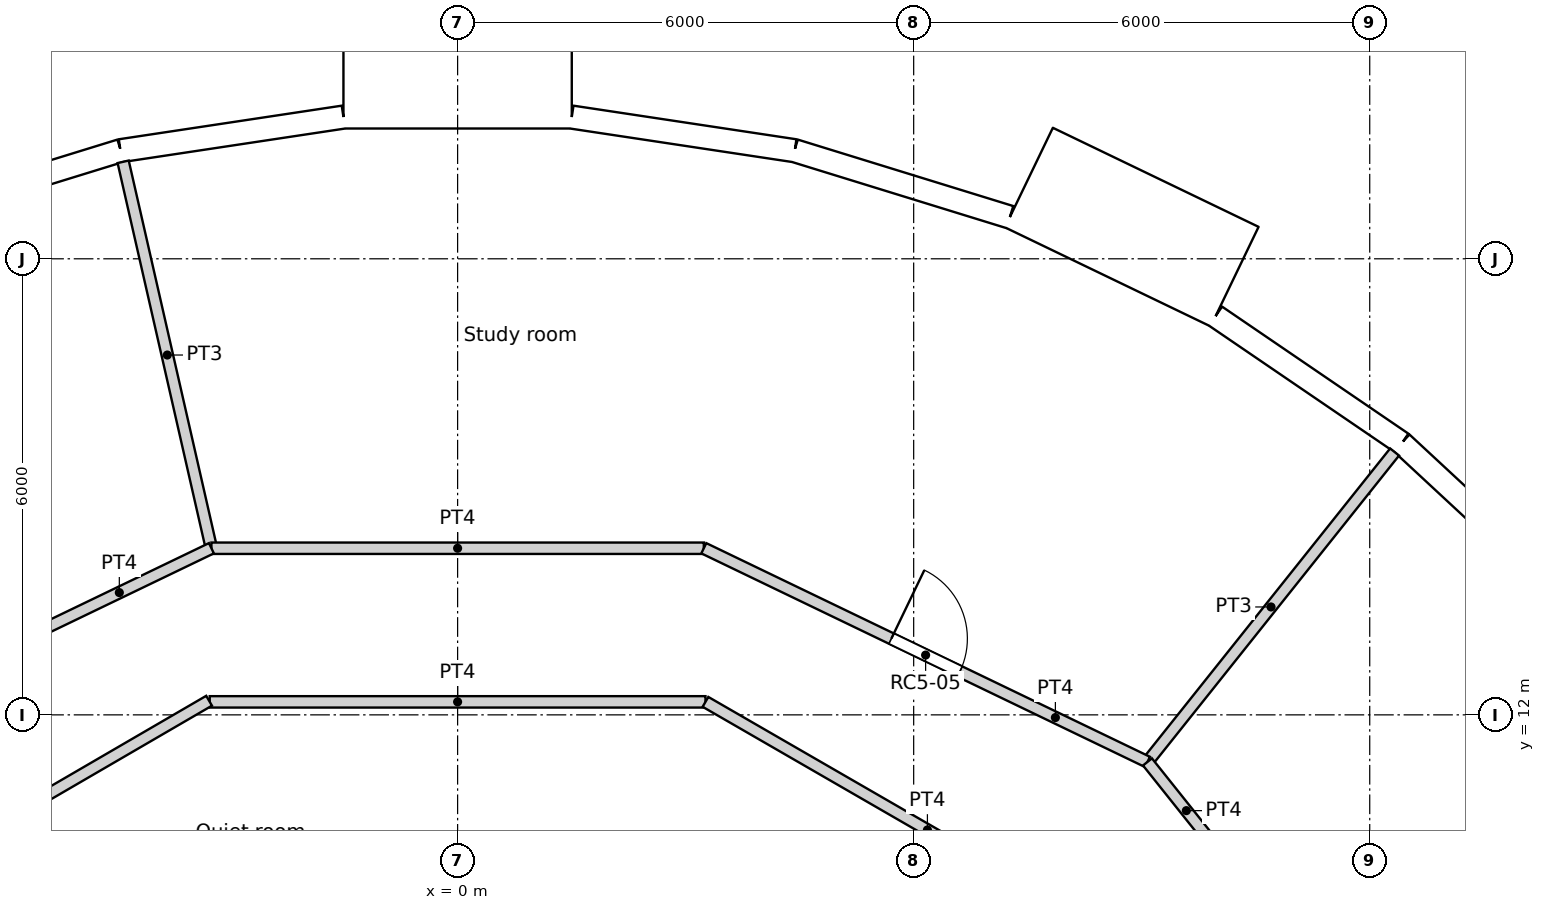
"""IFC4 building model, lengths in metres.
Left out: names, types, materials, properties, quantities, classifications, styles, units other than length and angle.
Written with IfcOpenShell. Run it as: python <this file> out.ifc"""

import sys

from ifc_helpers import new_model, si_unit, direction, frame, frame_2d, origin, origin_2d, place, context, subcontext, project, spatial, rectangle, circle, extrude, element, fill, save


model = new_model("IFC4")
c1 = context("Model", 3, precision=1e-05, world=origin(), true_north=direction((0.0, 1.0)))
c2 = subcontext(c1, "Body", "Model", "MODEL_VIEW")
j1 = project(units=[si_unit("LENGTHUNIT", "METRE"), si_unit("PLANEANGLEUNIT", "RADIAN")], contexts=[c1])
p1 = place(None, origin())
s1 = spatial("IfcSite", under=j1, at=p1, CompositionType="ELEMENT")
p2 = place(p1, origin())
s2 = spatial("IfcBuilding", under=s1, at=p2, CompositionType="ELEMENT")
p3 = place(p2, frame((0.0, 0.0, 270.6)))
s3 = spatial("IfcBuildingStorey", under=s2, at=p3, CompositionType="ELEMENT", Elevation=270.6)
for number, where, z_axis, x_axis in (
    (1, (11.735, 14.716, 0.0), (0.0, 0.0, 1.0), (1.0, 0.0, 0.0)),
    (2, (6.876, 17.521, 0.0), (0.0, 0.0, 1.0), (1.0, 0.0, 0.0)),
    (3, (1.406, 18.77, 0.0), (0.0, 0.0, 1.0), (1.0, 0.0, 0.0)),
    (4, (-4.188, 18.35, 0.0), (0.0, 0.0, 1.0), (1.0, 0.0, 0.0)),
):
    element("IfcColumn", number, at=place(p3, frame(where, z_axis=z_axis, x_axis=x_axis)), inside=s3, PredefinedType="COLUMN", context=c2, shape_type="SweptSolid", body=[
        extrude(circle(Radius=0.55, at=origin_2d()), origin(), (0.0, 0.0, 1.0), 3.6),
    ])
p4 = place(p3, frame((14.593, 13.561, 0.0), z_axis=(0.0, 0.0, 1.0), x_axis=(-0.733028283666, 0.680198158882, 0.0)))
e5 = element("IfcWall", 5, at=p4, inside=s3, PredefinedType="SOLIDWALL", context=c2, shape_type="SweptSolid", body=[
    extrude(rectangle(XDim=2.962, YDim=0.3, at=frame_2d((1.481, 0.0))), origin(), (0.0, 0.0, 1.0), 3.25),
])
p5 = place(p4, frame((1.481, 0.0, 1.55)))
e6 = element("IfcOpeningElement", 6, at=p5, cuts=e5, PredefinedType="OPENING", context=c2, shape_type="SweptSolid", body=[
    extrude(circle(Radius=0.9, at=origin_2d()), frame((0.0, 0.16, 0.0), z_axis=(0.0, -1.0, 0.0), x_axis=(1.0, 0.0, 0.0)), (0.0, 0.0, 1.0), 0.32),
])
p6 = place(p3, frame((12.421, 15.575, 0.0), z_axis=(0.0, 0.0, 1.0), x_axis=(-0.826236061068, 0.563324037646, 0.0)))
e7 = element("IfcWall", 7, at=p6, inside=s3, PredefinedType="SOLIDWALL", context=c2, shape_type="SweptSolid", body=[
    extrude(rectangle(XDim=2.962, YDim=0.3, at=frame_2d((1.481, 0.0))), origin(), (0.0, 0.0, 1.0), 3.25),
])
p7 = place(p6, frame((1.481, 0.0, 1.55)))
e8 = element("IfcOpeningElement", 8, at=p7, cuts=e7, PredefinedType="OPENING", context=c2, shape_type="SweptSolid", body=[
    extrude(circle(Radius=0.9, at=origin_2d()), frame((0.0, 0.16, 0.0), z_axis=(0.0, -1.0, 0.0), x_axis=(1.0, 0.0, 0.0)), (0.0, 0.0, 1.0), 0.32),
])
p8 = place(p3, frame((10.22, 17.766, -0.35), z_axis=(0.0, 0.0, 1.0), x_axis=(-0.900953362039, 0.433915935904, 0.0)))
e9 = element("IfcWall", 9, at=p8, inside=s3, PredefinedType="ELEMENTEDWALL", context=c2, shape_type="SweptSolid", body=[
    extrude(rectangle(XDim=3.0, YDim=1.45, at=frame_2d((1.5, 0.0))), origin(), (0.0, 0.0, 1.0), 3.6),
])
p9 = place(p8, frame((1.5, 0.0, 1.9)))
e10 = element("IfcOpeningElement", 10, at=p9, cuts=e9, PredefinedType="OPENING", context=c2, shape_type="SweptSolid", body=[
    extrude(circle(Radius=0.9, at=origin_2d()), frame((0.0, 0.735, 0.0), z_axis=(0.0, -1.0, 0.0), x_axis=(1.0, 0.0, 0.0)), (0.0, 0.0, 1.0), 1.47),
])
p10 = place(p3, frame((7.264, 18.549, 0.0), z_axis=(0.0, 0.0, 1.0), x_axis=(-0.955555982805, 0.29480970765, 0.0)))
e11 = element("IfcWall", 11, at=p10, inside=s3, PredefinedType="SOLIDWALL", context=c2, shape_type="SweptSolid", body=[
    extrude(rectangle(XDim=2.962, YDim=0.3, at=frame_2d((1.481, 0.0))), origin(), (0.0, 0.0, 1.0), 3.25),
])
p11 = place(p10, frame((1.481, 0.0, 1.55)))
e12 = element("IfcOpeningElement", 12, at=p11, cuts=e11, PredefinedType="OPENING", context=c2, shape_type="SweptSolid", body=[
    extrude(circle(Radius=0.9, at=origin_2d()), frame((0.0, 0.16, 0.0), z_axis=(0.0, -1.0, 0.0), x_axis=(1.0, 0.0, 0.0)), (0.0, 0.0, 1.0), 0.32),
])
p12 = place(p3, frame((4.433, 19.422, 0.0), z_axis=(0.0, 0.0, 1.0), x_axis=(-0.988835775663, 0.149009425104, 0.0)))
e13 = element("IfcWall", 13, at=p12, inside=s3, PredefinedType="SOLIDWALL", context=c2, shape_type="SweptSolid", body=[
    extrude(rectangle(XDim=2.962, YDim=0.3, at=frame_2d((1.481, 0.0))), origin(), (0.0, 0.0, 1.0), 3.25),
])
p13 = place(p12, frame((1.481, 0.0, 1.55)))
e14 = element("IfcOpeningElement", 14, at=p13, cuts=e13, PredefinedType="OPENING", context=c2, shape_type="SweptSolid", body=[
    extrude(circle(Radius=0.9, at=origin_2d()), frame((0.0, 0.16, 0.0), z_axis=(0.0, -1.0, 0.0), x_axis=(1.0, 0.0, 0.0)), (0.0, 0.0, 1.0), 0.32),
])
p14 = place(p3, frame((1.5, 20.441, -0.35), z_axis=(0.0, 0.0, 1.0), x_axis=(-1.0, 0.0, 0.0)))
e15 = element("IfcWall", 15, at=p14, inside=s3, PredefinedType="ELEMENTEDWALL", context=c2, shape_type="SweptSolid", body=[
    extrude(rectangle(XDim=3.0, YDim=1.45, at=frame_2d((1.5, 0.0))), origin(), (0.0, 0.0, 1.0), 3.6),
])
p15 = place(p14, frame((1.5, 0.0, 1.9)))
e16 = element("IfcOpeningElement", 16, at=p15, cuts=e15, PredefinedType="OPENING", context=c2, shape_type="SweptSolid", body=[
    extrude(circle(Radius=0.9, at=origin_2d()), frame((0.0, 0.735, 0.0), z_axis=(0.0, -1.0, 0.0), x_axis=(1.0, 0.0, 0.0)), (0.0, 0.0, 1.0), 1.47),
])
p16 = place(p3, frame((-1.504, 19.864, 0.0), z_axis=(0.0, 0.0, 1.0), x_axis=(-0.988835775663, -0.149009425104, 0.0)))
e17 = element("IfcWall", 17, at=p16, inside=s3, PredefinedType="SOLIDWALL", context=c2, shape_type="SweptSolid", body=[
    extrude(rectangle(XDim=2.962, YDim=0.3, at=frame_2d((1.481, 0.0))), origin(), (0.0, 0.0, 1.0), 3.25),
])
p17 = place(p16, frame((1.481, 0.0, 1.55)))
e18 = element("IfcOpeningElement", 18, at=p17, cuts=e17, PredefinedType="OPENING", context=c2, shape_type="SweptSolid", body=[
    extrude(circle(Radius=0.9, at=origin_2d()), frame((0.0, 0.16, 0.0), z_axis=(0.0, -1.0, 0.0), x_axis=(1.0, 0.0, 0.0)), (0.0, 0.0, 1.0), 0.32),
])
p18 = place(p3, frame((-4.433, 19.422, 0.0), z_axis=(0.0, 0.0, 1.0), x_axis=(-0.955555982805, -0.29480970765, 0.0)))
e19 = element("IfcWall", 19, at=p18, inside=s3, PredefinedType="SOLIDWALL", context=c2, shape_type="SweptSolid", body=[
    extrude(rectangle(XDim=2.962, YDim=0.3, at=frame_2d((1.481, 0.0))), origin(), (0.0, 0.0, 1.0), 3.25),
])
p19 = place(p18, frame((1.481, 0.0, 1.55)))
e20 = element("IfcOpeningElement", 20, at=p19, cuts=e19, PredefinedType="OPENING", context=c2, shape_type="SweptSolid", body=[
    extrude(circle(Radius=0.9, at=origin_2d()), frame((0.0, 0.16, 0.0), z_axis=(0.0, -1.0, 0.0), x_axis=(1.0, 0.0, 0.0)), (0.0, 0.0, 1.0), 0.32),
])
p20 = place(p3, frame((-9.092, 8.8, 0.0), z_axis=(0.0, 0.0, 1.0), x_axis=(0.864470922103, 0.502682827277, 0.0)))
e21 = element("IfcWall", 21, at=p20, inside=s3, PredefinedType="PARTITIONING", context=c2, shape_type="SweptSolid", body=[
    extrude(rectangle(XDim=6.735, YDim=0.15, at=frame_2d((3.368, 0.0))), origin(), (0.0, 0.0, 1.0), 3.1),
])
p21 = place(p3, frame((3.261, 12.171, 0.0), z_axis=(0.0, 0.0, 1.0), x_axis=(0.866066809554, -0.499928276245, 0.0)))
e22 = element("IfcWall", 22, at=p21, inside=s3, PredefinedType="PARTITIONING", context=c2, shape_type="SweptSolid", body=[
    extrude(rectangle(XDim=6.743, YDim=0.15, at=frame_2d((3.371, 0.0))), origin(), (0.0, 0.0, 1.0), 3.1),
])
p22 = place(p3, frame((-3.261, 12.171, 0.0), z_axis=(0.0, 0.0, 1.0), x_axis=(1.0, 0.0, 0.0)))
e23 = element("IfcWall", 23, at=p22, inside=s3, PredefinedType="PARTITIONING", context=c2, shape_type="SweptSolid", body=[
    extrude(rectangle(XDim=6.522, YDim=0.15, at=frame_2d((3.261, 0.0))), origin(), (0.0, 0.0, 1.0), 3.1),
])
p23 = place(p3, frame((9.076, 11.381, 0.0), z_axis=(0.0, 0.0, 1.0), x_axis=(0.623805208652, -0.781579849829, 0.0)))
e24 = element("IfcWall", 24, at=p23, inside=s3, PredefinedType="PARTITIONING", context=c2, shape_type="SweptSolid", body=[
    extrude(rectangle(XDim=1.64, YDim=0.15, at=frame_2d((0.82, 0.0))), origin(), (0.0, 0.0, 1.0), 3.1),
])
p24 = place(p3, frame((-3.239, 14.192, 0.0), z_axis=(0.0, 0.0, 1.0), x_axis=(1.0, 0.0, 0.0)))
e25 = element("IfcWall", 25, at=p24, inside=s3, PredefinedType="PARTITIONING", context=c2, shape_type="SweptSolid", body=[
    extrude(rectangle(XDim=6.478, YDim=0.15, at=frame_2d((3.239, 0.0))), origin(), (0.0, 0.0, 1.0), 3.1),
])
p25 = place(p3, frame((3.239, 14.192, 0.0), z_axis=(0.0, 0.0, 1.0), x_axis=(0.900976027191, -0.433868872388, 0.0)))
e26 = element("IfcWall", 26, at=p25, inside=s3, PredefinedType="PARTITIONING", context=c2, shape_type="SweptSolid", body=[
    extrude(rectangle(XDim=6.479, YDim=0.15, at=frame_2d((3.239, 0.0))), origin(), (0.0, 0.0, 1.0), 3.1),
])
p26 = place(p25, frame((2.739, 0.0, 0.0)))
e27 = element("IfcOpeningElement", 27, at=p26, cuts=e26, PredefinedType="OPENING", context=c2, shape_type="SweptSolid", body=[
    extrude(rectangle(XDim=1.0, YDim=2.04, at=frame_2d((0.5, 1.02))), frame((0.0, 0.075, 0.0), z_axis=(0.0, -1.0, 0.0), x_axis=(1.0, 0.0, 0.0)), (0.0, 0.0, 1.0), 0.15),
])
p27 = place(p3, frame((-9.076, 11.381, 0.0), z_axis=(0.0, 0.0, 1.0), x_axis=(0.900976027191, 0.433868872388, 0.0)))
e28 = element("IfcWall", 28, at=p27, inside=s3, PredefinedType="PARTITIONING", context=c2, shape_type="SweptSolid", body=[
    extrude(rectangle(XDim=6.479, YDim=0.15, at=frame_2d((3.239, 0.0))), origin(), (0.0, 0.0, 1.0), 3.1),
])
p28 = place(p27, frame((2.739, 0.0, 0.0)))
e29 = element("IfcOpeningElement", 29, at=p28, cuts=e28, PredefinedType="OPENING", context=c2, shape_type="SweptSolid", body=[
    extrude(rectangle(XDim=1.0, YDim=2.04, at=frame_2d((0.5, 1.02))), frame((0.0, 0.075, 0.0), z_axis=(0.0, -1.0, 0.0), x_axis=(1.0, 0.0, 0.0)), (0.0, 0.0, 1.0), 0.15),
])
p29 = place(p3, frame((9.076, 11.381, 0.0), z_axis=(0.0, 0.0, 1.0), x_axis=(0.623460949534, 0.781854490558, 0.0)))
e30 = element("IfcWall", 30, at=p29, inside=s3, PredefinedType="PARTITIONING", context=c2, shape_type="SweptSolid", body=[
    extrude(rectangle(XDim=5.214, YDim=0.15, at=frame_2d((2.607, 0.0))), origin(), (0.0, 0.0, 1.0), 3.1),
])
p30 = place(p3, frame((-4.4, 19.276, 0.0), z_axis=(0.0, 0.0, 1.0), x_axis=(0.222612505682, -0.974907007008, 0.0)))
e31 = element("IfcWall", 31, at=p30, inside=s3, PredefinedType="PARTITIONING", context=c2, shape_type="SweptSolid", body=[
    extrude(rectangle(XDim=5.215, YDim=0.15, at=frame_2d((2.607, 0.0))), origin(), (0.0, 0.0, 1.0), 3.1),
])
p31 = place(p5, origin())
e32 = element("IfcWindow", 32, at=p31, inside=s3, PartitioningType="SINGLE_PANEL", PredefinedType="WINDOW", context=c2, shape_type="SweptSolid", body=[
    extrude(circle(Radius=0.9, at=origin_2d()), frame((0.0, 0.12, 0.0), z_axis=(0.0, -1.0, 0.0), x_axis=(1.0, 0.0, 0.0)), (0.0, 0.0, 1.0), 0.1),
])
fill(e6, e32)
p32 = place(p7, origin())
e33 = element("IfcWindow", 33, at=p32, inside=s3, PartitioningType="SINGLE_PANEL", PredefinedType="WINDOW", context=c2, shape_type="SweptSolid", body=[
    extrude(circle(Radius=0.9, at=origin_2d()), frame((0.0, 0.12, 0.0), z_axis=(0.0, -1.0, 0.0), x_axis=(1.0, 0.0, 0.0)), (0.0, 0.0, 1.0), 0.1),
])
fill(e8, e33)
p33 = place(p9, origin())
e34 = element("IfcWindow", 34, at=p33, inside=s3, PartitioningType="SINGLE_PANEL", PredefinedType="WINDOW", context=c2, shape_type="SweptSolid", body=[
    extrude(circle(Radius=0.9, at=origin_2d()), frame((0.0, 0.695, 0.0), z_axis=(0.0, -1.0, 0.0), x_axis=(1.0, 0.0, 0.0)), (0.0, 0.0, 1.0), 0.1),
])
fill(e10, e34)
p34 = place(p11, origin())
e35 = element("IfcWindow", 35, at=p34, inside=s3, PartitioningType="SINGLE_PANEL", PredefinedType="WINDOW", context=c2, shape_type="SweptSolid", body=[
    extrude(circle(Radius=0.9, at=origin_2d()), frame((0.0, 0.12, 0.0), z_axis=(0.0, -1.0, 0.0), x_axis=(1.0, 0.0, 0.0)), (0.0, 0.0, 1.0), 0.1),
])
fill(e12, e35)
p35 = place(p13, origin())
e36 = element("IfcWindow", 36, at=p35, inside=s3, PartitioningType="SINGLE_PANEL", PredefinedType="WINDOW", context=c2, shape_type="SweptSolid", body=[
    extrude(circle(Radius=0.9, at=origin_2d()), frame((0.0, 0.12, 0.0), z_axis=(0.0, -1.0, 0.0), x_axis=(1.0, 0.0, 0.0)), (0.0, 0.0, 1.0), 0.1),
])
fill(e14, e36)
p36 = place(p15, origin())
e37 = element("IfcWindow", 37, at=p36, inside=s3, PartitioningType="SINGLE_PANEL", PredefinedType="WINDOW", context=c2, shape_type="SweptSolid", body=[
    extrude(circle(Radius=0.9, at=origin_2d()), frame((0.0, 0.695, 0.0), z_axis=(0.0, -1.0, 0.0), x_axis=(1.0, 0.0, 0.0)), (0.0, 0.0, 1.0), 0.1),
])
fill(e16, e37)
p37 = place(p17, origin())
e38 = element("IfcWindow", 38, at=p37, inside=s3, PartitioningType="SINGLE_PANEL", PredefinedType="WINDOW", context=c2, shape_type="SweptSolid", body=[
    extrude(circle(Radius=0.9, at=origin_2d()), frame((0.0, 0.12, 0.0), z_axis=(0.0, -1.0, 0.0), x_axis=(1.0, 0.0, 0.0)), (0.0, 0.0, 1.0), 0.1),
])
fill(e18, e38)
p38 = place(p19, origin())
e39 = element("IfcWindow", 39, at=p38, inside=s3, PartitioningType="SINGLE_PANEL", PredefinedType="WINDOW", context=c2, shape_type="SweptSolid", body=[
    extrude(circle(Radius=0.9, at=origin_2d()), frame((0.0, 0.12, 0.0), z_axis=(0.0, -1.0, 0.0), x_axis=(1.0, 0.0, 0.0)), (0.0, 0.0, 1.0), 0.1),
])
fill(e20, e39)
p39 = place(p26, origin())
e40 = element("IfcDoor", 40, at=p39, inside=s3, OperationType="SINGLE_SWING_LEFT", PredefinedType="DOOR", context=c2, shape_type="SweptSolid", body=[
    extrude(rectangle(XDim=1.0, YDim=2.04, at=frame_2d((0.5, 1.02))), frame((0.0, 0.025, 0.0), z_axis=(0.0, -1.0, 0.0), x_axis=(1.0, 0.0, 0.0)), (0.0, 0.0, 1.0), 0.05),
])
fill(e27, e40)
save(model, sys.argv[1])
